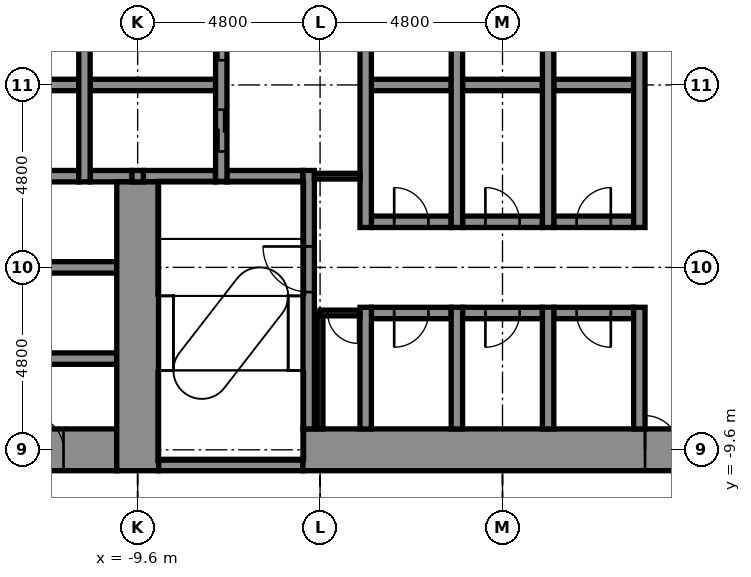
"""IFC4 building model, lengths in metres.
Left out: names, types, materials, properties, quantities, classifications, styles, units other than length and angle.
Written with IfcOpenShell. Run it as: python <this file> out.ifc"""

import sys

from ifc_helpers import new_model, si_unit, direction, frame, frame_2d, origin, place, context, subcontext, project, spatial, rectangle, extrude, element, fill, save


model = new_model("IFC4")
c1 = context("Model", 3, precision=1e-05, world=origin(), true_north=direction((0.0, 1.0)))
c2 = subcontext(c1, "Body", "Model", "MODEL_VIEW")
j1 = project(units=[si_unit("LENGTHUNIT", "METRE"), si_unit("PLANEANGLEUNIT", "RADIAN")], contexts=[c1])
p1 = place(None, origin())
s1 = spatial("IfcSite", under=j1, at=p1, CompositionType="ELEMENT")
p2 = place(p1, origin())
s2 = spatial("IfcBuilding", under=s1, at=p2, CompositionType="ELEMENT")
p3 = place(p2, frame((0.0, 0.0, 12.4)))
s3 = spatial("IfcBuildingStorey", under=s2, at=p3, CompositionType="ELEMENT", Elevation=12.4)
p4 = place(p3, frame((-9.05, -10.0, -0.3), z_axis=(0.0, 0.0, 1.0), x_axis=(1.0, 0.0, 0.0)))
e1 = element("IfcWall", 1, at=p4, inside=s3, PredefinedType="STANDARD", context=c2, shape_type="SweptSolid", body=[
    extrude(rectangle(XDim=3.8, YDim=0.3, at=frame_2d((1.9, 0.0))), origin(), (0.0, 0.0, 1.0), 5.05),
])
p5 = place(p3, frame((-13.85, -9.6, -0.3), z_axis=(0.0, 0.0, 1.0), x_axis=(1.0, 0.0, 0.0)))
e2 = element("IfcWall", 2, at=p5, inside=s3, PredefinedType="SHEAR", context=c2, shape_type="SweptSolid", body=[
    extrude(rectangle(XDim=3.7, YDim=1.1, at=frame_2d((1.85, 0.0))), origin(), (0.0, 0.0, 1.0), 5.05),
])
p6 = place(p5, frame((1.4, 0.0, 0.3)))
e3 = element("IfcOpeningElement", 3, at=p6, cuts=e2, PredefinedType="OPENING", context=c2, shape_type="SweptSolid", body=[
    extrude(rectangle(XDim=0.9, YDim=2.1, at=frame_2d((0.45, 1.05))), frame((0.0, 0.56, 0.0), z_axis=(0.0, -1.0, 0.0), x_axis=(1.0, 0.0, 0.0)), (0.0, 0.0, 1.0), 1.12),
])
p7 = place(p3, frame((-5.25, -9.6, -0.3), z_axis=(0.0, 0.0, 1.0), x_axis=(1.0, 0.0, 0.0)))
e4 = element("IfcWall", 4, at=p7, inside=s3, PredefinedType="SHEAR", context=c2, shape_type="SweptSolid", body=[
    extrude(rectangle(XDim=10.2, YDim=1.1, at=frame_2d((5.1, 0.0))), origin(), (0.0, 0.0, 1.0), 5.05),
])
p8 = place(p7, frame((9.0, 0.0, 0.3)))
e5 = element("IfcOpeningElement", 5, at=p8, cuts=e4, PredefinedType="OPENING", context=c2, shape_type="SweptSolid", body=[
    extrude(rectangle(XDim=0.9, YDim=2.1, at=frame_2d((0.45, 1.05))), frame((0.0, 0.56, 0.0), z_axis=(0.0, -1.0, 0.0), x_axis=(1.0, 0.0, 0.0)), (0.0, 0.0, 1.0), 1.12),
])
p9 = place(p3, frame((-13.85, -7.2, -0.3), z_axis=(0.0, 0.0, 1.0), x_axis=(1.0, 0.0, 0.0)))
e6 = element("IfcWall", 6, at=p9, inside=s3, PredefinedType="STANDARD", context=c2, shape_type="SweptSolid", body=[
    extrude(rectangle(XDim=3.7, YDim=0.3, at=frame_2d((1.85, 0.0))), origin(), (0.0, 0.0, 1.0), 5.05),
])
p10 = place(p3, frame((-3.45, -6.0, -0.3), z_axis=(0.0, 0.0, 1.0), x_axis=(1.0, 0.0, 0.0)))
e7 = element("IfcWall", 7, at=p10, inside=s3, PredefinedType="STANDARD", context=c2, shape_type="SweptSolid", body=[
    extrude(rectangle(XDim=2.1, YDim=0.3, at=frame_2d((1.05, 0.0))), origin(), (0.0, 0.0, 1.0), 5.05),
])
p11 = place(p10, frame((0.6, 0.0, 0.3)))
e8 = element("IfcOpeningElement", 8, at=p11, cuts=e7, PredefinedType="OPENING", context=c2, shape_type="SweptSolid", body=[
    extrude(rectangle(XDim=0.9, YDim=2.1, at=frame_2d((0.45, 1.05))), frame((0.0, 0.16, 0.0), z_axis=(0.0, -1.0, 0.0), x_axis=(1.0, 0.0, 0.0)), (0.0, 0.0, 1.0), 0.32),
])
p12 = place(p3, frame((-1.05, -6.0, -0.3), z_axis=(0.0, 0.0, 1.0), x_axis=(1.0, 0.0, 0.0)))
e9 = element("IfcWall", 9, at=p12, inside=s3, PredefinedType="STANDARD", context=c2, shape_type="SweptSolid", body=[
    extrude(rectangle(XDim=2.1, YDim=0.3, at=frame_2d((1.05, 0.0))), origin(), (0.0, 0.0, 1.0), 5.05),
])
p13 = place(p12, frame((0.6, 0.0, 0.3)))
e10 = element("IfcOpeningElement", 10, at=p13, cuts=e9, PredefinedType="OPENING", context=c2, shape_type="SweptSolid", body=[
    extrude(rectangle(XDim=0.9, YDim=2.1, at=frame_2d((0.45, 1.05))), frame((0.0, 0.16, 0.0), z_axis=(0.0, -1.0, 0.0), x_axis=(1.0, 0.0, 0.0)), (0.0, 0.0, 1.0), 0.32),
])
p14 = place(p3, frame((1.35, -6.0, -0.3), z_axis=(0.0, 0.0, 1.0), x_axis=(1.0, 0.0, 0.0)))
e11 = element("IfcWall", 11, at=p14, inside=s3, PredefinedType="STANDARD", context=c2, shape_type="SweptSolid", body=[
    extrude(rectangle(XDim=2.1, YDim=0.3, at=frame_2d((1.05, 0.0))), origin(), (0.0, 0.0, 1.0), 5.05),
])
p15 = place(p14, frame((0.6, 0.0, 0.3)))
e12 = element("IfcOpeningElement", 12, at=p15, cuts=e11, PredefinedType="OPENING", context=c2, shape_type="SweptSolid", body=[
    extrude(rectangle(XDim=0.9, YDim=2.1, at=frame_2d((0.45, 1.05))), frame((0.0, 0.16, 0.0), z_axis=(0.0, -1.0, 0.0), x_axis=(1.0, 0.0, 0.0)), (0.0, 0.0, 1.0), 0.32),
])
p16 = place(p3, frame((-13.85, -4.8, -0.3), z_axis=(0.0, 0.0, 1.0), x_axis=(1.0, 0.0, 0.0)))
e13 = element("IfcWall", 13, at=p16, inside=s3, PredefinedType="STANDARD", context=c2, shape_type="SweptSolid", body=[
    extrude(rectangle(XDim=3.7, YDim=0.3, at=frame_2d((1.85, 0.0))), origin(), (0.0, 0.0, 1.0), 5.05),
])
p17 = place(p3, frame((-3.45, -3.6, -0.3), z_axis=(0.0, 0.0, 1.0), x_axis=(1.0, 0.0, 0.0)))
e14 = element("IfcWall", 14, at=p17, inside=s3, PredefinedType="STANDARD", context=c2, shape_type="SweptSolid", body=[
    extrude(rectangle(XDim=2.1, YDim=0.3, at=frame_2d((1.05, 0.0))), origin(), (0.0, 0.0, 1.0), 5.05),
])
p18 = place(p17, frame((0.6, 0.0, 0.3)))
e15 = element("IfcOpeningElement", 15, at=p18, cuts=e14, PredefinedType="OPENING", context=c2, shape_type="SweptSolid", body=[
    extrude(rectangle(XDim=0.9, YDim=2.1, at=frame_2d((0.45, 1.05))), frame((0.0, 0.16, 0.0), z_axis=(0.0, -1.0, 0.0), x_axis=(1.0, 0.0, 0.0)), (0.0, 0.0, 1.0), 0.32),
])
p19 = place(p3, frame((-1.05, -3.6, -0.3), z_axis=(0.0, 0.0, 1.0), x_axis=(1.0, 0.0, 0.0)))
e16 = element("IfcWall", 16, at=p19, inside=s3, PredefinedType="STANDARD", context=c2, shape_type="SweptSolid", body=[
    extrude(rectangle(XDim=2.1, YDim=0.3, at=frame_2d((1.05, 0.0))), origin(), (0.0, 0.0, 1.0), 5.05),
])
p20 = place(p19, frame((0.6, 0.0, 0.3)))
e17 = element("IfcOpeningElement", 17, at=p20, cuts=e16, PredefinedType="OPENING", context=c2, shape_type="SweptSolid", body=[
    extrude(rectangle(XDim=0.9, YDim=2.1, at=frame_2d((0.45, 1.05))), frame((0.0, 0.16, 0.0), z_axis=(0.0, -1.0, 0.0), x_axis=(1.0, 0.0, 0.0)), (0.0, 0.0, 1.0), 0.32),
])
p21 = place(p3, frame((1.35, -3.6, -0.3), z_axis=(0.0, 0.0, 1.0), x_axis=(1.0, 0.0, 0.0)))
e18 = element("IfcWall", 18, at=p21, inside=s3, PredefinedType="STANDARD", context=c2, shape_type="SweptSolid", body=[
    extrude(rectangle(XDim=2.1, YDim=0.3, at=frame_2d((1.05, 0.0))), origin(), (0.0, 0.0, 1.0), 5.05),
])
p22 = place(p21, frame((0.6, 0.0, 0.3)))
e19 = element("IfcOpeningElement", 19, at=p22, cuts=e18, PredefinedType="OPENING", context=c2, shape_type="SweptSolid", body=[
    extrude(rectangle(XDim=0.9, YDim=2.1, at=frame_2d((0.45, 1.05))), frame((0.0, 0.16, 0.0), z_axis=(0.0, -1.0, 0.0), x_axis=(1.0, 0.0, 0.0)), (0.0, 0.0, 1.0), 0.32),
])
p23 = place(p3, frame((-13.85, -2.4, -0.3), z_axis=(0.0, 0.0, 1.0), x_axis=(1.0, 0.0, 0.0)))
e20 = element("IfcWall", 20, at=p23, inside=s3, PredefinedType="STANDARD", context=c2, shape_type="SweptSolid", body=[
    extrude(rectangle(XDim=2.7, YDim=0.3, at=frame_2d((1.35, 0.0))), origin(), (0.0, 0.0, 1.0), 5.05),
])
p24 = place(p3, frame((-10.85, -2.4, -0.3), z_axis=(0.0, 0.0, 1.0), x_axis=(1.0, 0.0, 0.0)))
e21 = element("IfcWall", 21, at=p24, inside=s3, PredefinedType="STANDARD", context=c2, shape_type="SweptSolid", body=[
    extrude(rectangle(XDim=1.1, YDim=0.3, at=frame_2d((0.55, 0.0))), origin(), (0.0, 0.0, 1.0), 5.05),
])
p25 = place(p3, frame((-9.45, -2.4, -0.3), z_axis=(0.0, 0.0, 1.0), x_axis=(1.0, 0.0, 0.0)))
e22 = element("IfcWall", 22, at=p25, inside=s3, PredefinedType="STANDARD", context=c2, shape_type="SweptSolid", body=[
    extrude(rectangle(XDim=1.9, YDim=0.3, at=frame_2d((0.95, 0.0))), origin(), (0.0, 0.0, 1.0), 5.05),
])
p26 = place(p3, frame((-7.25, -2.4, -0.3), z_axis=(0.0, 0.0, 1.0), x_axis=(1.0, 0.0, 0.0)))
e23 = element("IfcWall", 23, at=p26, inside=s3, PredefinedType="STANDARD", context=c2, shape_type="SweptSolid", body=[
    extrude(rectangle(XDim=2.0, YDim=0.3, at=frame_2d((1.0, 0.0))), origin(), (0.0, 0.0, 1.0), 5.05),
])
p27 = place(p3, frame((-13.85, 0.0, -0.3), z_axis=(0.0, 0.0, 1.0), x_axis=(1.0, 0.0, 0.0)))
e24 = element("IfcWall", 24, at=p27, inside=s3, PredefinedType="STANDARD", context=c2, shape_type="SweptSolid", body=[
    extrude(rectangle(XDim=2.7, YDim=0.3, at=frame_2d((1.35, 0.0))), origin(), (0.0, 0.0, 1.0), 5.05),
])
p28 = place(p3, frame((-10.85, 0.0, -0.3), z_axis=(0.0, 0.0, 1.0), x_axis=(1.0, 0.0, 0.0)))
e25 = element("IfcWall", 25, at=p28, inside=s3, PredefinedType="STANDARD", context=c2, shape_type="SweptSolid", body=[
    extrude(rectangle(XDim=3.3, YDim=0.3, at=frame_2d((1.65, 0.0))), origin(), (0.0, 0.0, 1.0), 5.05),
])
p29 = place(p3, frame((-3.45, 0.0, -0.3), z_axis=(0.0, 0.0, 1.0), x_axis=(1.0, 0.0, 0.0)))
e26 = element("IfcWall", 26, at=p29, inside=s3, PredefinedType="STANDARD", context=c2, shape_type="SweptSolid", body=[
    extrude(rectangle(XDim=2.1, YDim=0.3, at=frame_2d((1.05, 0.0))), origin(), (0.0, 0.0, 1.0), 5.05),
])
p30 = place(p3, frame((-1.05, 0.0, -0.3), z_axis=(0.0, 0.0, 1.0), x_axis=(1.0, 0.0, 0.0)))
e27 = element("IfcWall", 27, at=p30, inside=s3, PredefinedType="STANDARD", context=c2, shape_type="SweptSolid", body=[
    extrude(rectangle(XDim=2.1, YDim=0.3, at=frame_2d((1.05, 0.0))), origin(), (0.0, 0.0, 1.0), 5.05),
])
p31 = place(p3, frame((1.35, 0.0, -0.3), z_axis=(0.0, 0.0, 1.0), x_axis=(1.0, 0.0, 0.0)))
e28 = element("IfcWall", 28, at=p31, inside=s3, PredefinedType="STANDARD", context=c2, shape_type="SweptSolid", body=[
    extrude(rectangle(XDim=2.1, YDim=0.3, at=frame_2d((1.05, 0.0))), origin(), (0.0, 0.0, 1.0), 5.05),
])
p32 = place(p3, frame((-11.0, -2.55, -0.3), z_axis=(0.0, 0.0, 1.0), x_axis=(0.0, 1.0, 0.0)))
e29 = element("IfcWall", 29, at=p32, inside=s3, PredefinedType="STANDARD", context=c2, shape_type="SweptSolid", body=[
    extrude(rectangle(XDim=5.1, YDim=0.3, at=frame_2d((2.55, 0.0))), origin(), (0.0, 0.0, 1.0), 5.05),
])
p33 = place(p3, frame((-9.6, -10.15, -0.3), z_axis=(0.0, 0.0, 1.0), x_axis=(0.0, 1.0, 0.0)))
e30 = element("IfcWall", 30, at=p33, inside=s3, PredefinedType="SHEAR", context=c2, shape_type="SweptSolid", body=[
    extrude(rectangle(XDim=7.6, YDim=1.1, at=frame_2d((3.8, 0.0))), origin(), (0.0, 0.0, 1.0), 5.05),
])
p34 = place(p3, frame((-9.6, -2.55, -0.3), z_axis=(0.0, 0.0, 1.0), x_axis=(0.0, 1.0, 0.0)))
e31 = element("IfcWall", 31, at=p34, inside=s3, PredefinedType="STANDARD", context=c2, shape_type="SweptSolid", body=[
    extrude(rectangle(XDim=0.3, YDim=0.3, at=frame_2d((0.15, 0.0))), origin(), (0.0, 0.0, 1.0), 5.05),
])
p35 = place(p3, frame((-7.4, -2.55, -0.3), z_axis=(0.0, 0.0, 1.0), x_axis=(0.0, 1.0, 0.0)))
e32 = element("IfcWall", 32, at=p35, inside=s3, PredefinedType="STANDARD", context=c2, shape_type="SweptSolid", body=[
    extrude(rectangle(XDim=5.1, YDim=0.3, at=frame_2d((2.55, 0.0))), origin(), (0.0, 0.0, 1.0), 5.05),
])
p36 = place(p35, frame((0.8, 0.0, 0.3)))
e33 = element("IfcOpeningElement", 33, at=p36, cuts=e32, PredefinedType="OPENING", context=c2, shape_type="SweptSolid", body=[
    extrude(rectangle(XDim=1.1, YDim=2.1, at=frame_2d((0.55, 1.05))), frame((0.0, 0.16, 0.0), z_axis=(0.0, -1.0, 0.0), x_axis=(1.0, 0.0, 0.0)), (0.0, 0.0, 1.0), 0.32),
])
p37 = place(p35, frame((3.2, 0.0, 0.3)))
e34 = element("IfcOpeningElement", 34, at=p37, cuts=e32, PredefinedType="OPENING", context=c2, shape_type="SweptSolid", body=[
    extrude(rectangle(XDim=1.1, YDim=2.1, at=frame_2d((0.55, 1.05))), frame((0.0, 0.16, 0.0), z_axis=(0.0, -1.0, 0.0), x_axis=(1.0, 0.0, 0.0)), (0.0, 0.0, 1.0), 0.32),
])
p38 = place(p3, frame((-5.1, -9.05, -0.3), z_axis=(0.0, 0.0, 1.0), x_axis=(0.0, 1.0, 0.0)))
e35 = element("IfcWall", 35, at=p38, inside=s3, PredefinedType="STANDARD", context=c2, shape_type="SweptSolid", body=[
    extrude(rectangle(XDim=6.8, YDim=0.3, at=frame_2d((3.4, 0.0))), origin(), (0.0, 0.0, 1.0), 5.05),
])
p39 = place(p38, frame((3.6, 0.0, 0.3)))
e36 = element("IfcOpeningElement", 36, at=p39, cuts=e35, PredefinedType="OPENING", context=c2, shape_type="SweptSolid", body=[
    extrude(rectangle(XDim=1.2, YDim=2.1, at=frame_2d((0.6, 1.05))), frame((0.0, 0.16, 0.0), z_axis=(0.0, -1.0, 0.0), x_axis=(1.0, 0.0, 0.0)), (0.0, 0.0, 1.0), 0.32),
])
p40 = place(p3, frame((-3.6, -9.05, -0.3), z_axis=(0.0, 0.0, 1.0), x_axis=(0.0, 1.0, 0.0)))
e37 = element("IfcWall", 37, at=p40, inside=s3, PredefinedType="STANDARD", context=c2, shape_type="SweptSolid", body=[
    extrude(rectangle(XDim=3.2, YDim=0.3, at=frame_2d((1.6, 0.0))), origin(), (0.0, 0.0, 1.0), 5.05),
])
p41 = place(p3, frame((-3.6, -3.75, -0.3), z_axis=(0.0, 0.0, 1.0), x_axis=(0.0, 1.0, 0.0)))
e38 = element("IfcWall", 38, at=p41, inside=s3, PredefinedType="STANDARD", context=c2, shape_type="SweptSolid", body=[
    extrude(rectangle(XDim=7.5, YDim=0.3, at=frame_2d((3.75, 0.0))), origin(), (0.0, 0.0, 1.0), 5.05),
])
p42 = place(p3, frame((-1.2, -9.05, -0.3), z_axis=(0.0, 0.0, 1.0), x_axis=(0.0, 1.0, 0.0)))
e39 = element("IfcWall", 39, at=p42, inside=s3, PredefinedType="STANDARD", context=c2, shape_type="SweptSolid", body=[
    extrude(rectangle(XDim=3.2, YDim=0.3, at=frame_2d((1.6, 0.0))), origin(), (0.0, 0.0, 1.0), 5.05),
])
p43 = place(p3, frame((-1.2, -3.75, -0.3), z_axis=(0.0, 0.0, 1.0), x_axis=(0.0, 1.0, 0.0)))
e40 = element("IfcWall", 40, at=p43, inside=s3, PredefinedType="STANDARD", context=c2, shape_type="SweptSolid", body=[
    extrude(rectangle(XDim=7.5, YDim=0.3, at=frame_2d((3.75, 0.0))), origin(), (0.0, 0.0, 1.0), 5.05),
])
p44 = place(p3, frame((1.2, -9.05, -0.3), z_axis=(0.0, 0.0, 1.0), x_axis=(0.0, 1.0, 0.0)))
e41 = element("IfcWall", 41, at=p44, inside=s3, PredefinedType="STANDARD", context=c2, shape_type="SweptSolid", body=[
    extrude(rectangle(XDim=3.2, YDim=0.3, at=frame_2d((1.6, 0.0))), origin(), (0.0, 0.0, 1.0), 5.05),
])
p45 = place(p3, frame((1.2, -3.75, -0.3), z_axis=(0.0, 0.0, 1.0), x_axis=(0.0, 1.0, 0.0)))
e42 = element("IfcWall", 42, at=p45, inside=s3, PredefinedType="STANDARD", context=c2, shape_type="SweptSolid", body=[
    extrude(rectangle(XDim=7.5, YDim=0.3, at=frame_2d((3.75, 0.0))), origin(), (0.0, 0.0, 1.0), 5.05),
])
p46 = place(p3, frame((3.6, -9.05, -0.3), z_axis=(0.0, 0.0, 1.0), x_axis=(0.0, 1.0, 0.0)))
e43 = element("IfcWall", 43, at=p46, inside=s3, PredefinedType="STANDARD", context=c2, shape_type="SweptSolid", body=[
    extrude(rectangle(XDim=3.2, YDim=0.3, at=frame_2d((1.6, 0.0))), origin(), (0.0, 0.0, 1.0), 5.05),
])
p47 = place(p3, frame((3.6, -3.75, -0.3), z_axis=(0.0, 0.0, 1.0), x_axis=(0.0, 1.0, 0.0)))
e44 = element("IfcWall", 44, at=p47, inside=s3, PredefinedType="STANDARD", context=c2, shape_type="SweptSolid", body=[
    extrude(rectangle(XDim=7.5, YDim=0.3, at=frame_2d((3.75, 0.0))), origin(), (0.0, 0.0, 1.0), 5.05),
])
p48 = place(p3, frame((-4.8, -9.05, 0.0), z_axis=(0.0, 0.0, 1.0), x_axis=(0.0, 1.0, 0.0)))
e45 = element("IfcWall", 45, at=p48, inside=s3, PredefinedType="PARTITIONING", context=c2, shape_type="SweptSolid", body=[
    extrude(rectangle(XDim=3.05, YDim=0.15, at=frame_2d((1.525, 0.0))), origin(), (0.0, 0.0, 1.0), 4.7),
])
p49 = place(p3, frame((-4.8, -6.0, 0.0), z_axis=(0.0, 0.0, 1.0), x_axis=(1.0, 0.0, 0.0)))
e46 = element("IfcWall", 46, at=p49, inside=s3, PredefinedType="PARTITIONING", context=c2, shape_type="SweptSolid", body=[
    extrude(rectangle(XDim=1.05, YDim=0.15, at=frame_2d((0.525, 0.0))), origin(), (0.0, 0.0, 1.0), 4.7),
])
p50 = place(p49, frame((0.2, 0.0, 0.0)))
e47 = element("IfcOpeningElement", 47, at=p50, cuts=e46, PredefinedType="OPENING", context=c2, shape_type="SweptSolid", body=[
    extrude(rectangle(XDim=0.8, YDim=2.1, at=frame_2d((0.4, 1.05))), frame((0.0, 0.085, 0.0), z_axis=(0.0, -1.0, 0.0), x_axis=(1.0, 0.0, 0.0)), (0.0, 0.0, 1.0), 0.17),
])
p51 = place(p3, frame((-4.95, -2.4, 0.0), z_axis=(0.0, 0.0, 1.0), x_axis=(1.0, 0.0, 0.0)))
e48 = element("IfcWall", 48, at=p51, inside=s3, PredefinedType="PARTITIONING", context=c2, shape_type="SweptSolid", body=[
    extrude(rectangle(XDim=1.2, YDim=0.15, at=frame_2d((0.6, 0.0))), origin(), (0.0, 0.0, 1.0), 4.75),
])
p52 = place(p50, frame((0.8, 0.0, 0.0), z_axis=(0.0, 0.0, 1.0), x_axis=(-1.0, 0.0, 0.0)))
e49 = element("IfcDoor", 49, at=p52, inside=s3, OperationType="SINGLE_SWING_RIGHT", PredefinedType="DOOR", context=c2, shape_type="SweptSolid", body=[
    extrude(rectangle(XDim=0.8, YDim=2.1, at=frame_2d((0.4, 1.05))), frame((0.0, 0.025, 0.0), z_axis=(0.0, -1.0, 0.0), x_axis=(1.0, 0.0, 0.0)), (0.0, 0.0, 1.0), 0.05),
])
fill(e47, e49)
p53 = place(p36, origin())
e50 = element("IfcDoor", 50, at=p53, inside=s3, OperationType="DOUBLE_DOOR_SLIDING", PredefinedType="DOOR", context=c2, shape_type="SweptSolid", body=[
    extrude(rectangle(XDim=1.1, YDim=2.1, at=frame_2d((0.55, 1.05))), frame((0.0, 0.025, 0.0), z_axis=(0.0, -1.0, 0.0), x_axis=(1.0, 0.0, 0.0)), (0.0, 0.0, 1.0), 0.05),
])
fill(e33, e50)
p54 = place(p37, origin())
e51 = element("IfcDoor", 51, at=p54, inside=s3, OperationType="DOUBLE_DOOR_SLIDING", PredefinedType="DOOR", context=c2, shape_type="SweptSolid", body=[
    extrude(rectangle(XDim=1.1, YDim=2.1, at=frame_2d((0.55, 1.05))), frame((0.0, 0.025, 0.0), z_axis=(0.0, -1.0, 0.0), x_axis=(1.0, 0.0, 0.0)), (0.0, 0.0, 1.0), 0.05),
])
fill(e34, e51)
p55 = place(p39, origin())
e52 = element("IfcDoor", 52, at=p55, inside=s3, OperationType="SINGLE_SWING_RIGHT", PredefinedType="DOOR", context=c2, shape_type="SweptSolid", body=[
    extrude(rectangle(XDim=1.2, YDim=2.1, at=frame_2d((0.6, 1.05))), frame((0.0, 0.025, 0.0), z_axis=(0.0, -1.0, 0.0), x_axis=(1.0, 0.0, 0.0)), (0.0, 0.0, 1.0), 0.05),
])
fill(e36, e52)
p56 = place(p18, origin())
e53 = element("IfcDoor", 53, at=p56, inside=s3, OperationType="SINGLE_SWING_LEFT", PredefinedType="DOOR", context=c2, shape_type="SweptSolid", body=[
    extrude(rectangle(XDim=0.9, YDim=2.1, at=frame_2d((0.45, 1.05))), frame((0.0, 0.025, 0.0), z_axis=(0.0, -1.0, 0.0), x_axis=(1.0, 0.0, 0.0)), (0.0, 0.0, 1.0), 0.05),
])
fill(e15, e53)
p57 = place(p20, origin())
e54 = element("IfcDoor", 54, at=p57, inside=s3, OperationType="SINGLE_SWING_LEFT", PredefinedType="DOOR", context=c2, shape_type="SweptSolid", body=[
    extrude(rectangle(XDim=0.9, YDim=2.1, at=frame_2d((0.45, 1.05))), frame((0.0, 0.025, 0.0), z_axis=(0.0, -1.0, 0.0), x_axis=(1.0, 0.0, 0.0)), (0.0, 0.0, 1.0), 0.05),
])
fill(e17, e54)
p58 = place(p22, origin())
e55 = element("IfcDoor", 55, at=p58, inside=s3, OperationType="SINGLE_SWING_RIGHT", PredefinedType="DOOR", context=c2, shape_type="SweptSolid", body=[
    extrude(rectangle(XDim=0.9, YDim=2.1, at=frame_2d((0.45, 1.05))), frame((0.0, 0.025, 0.0), z_axis=(0.0, -1.0, 0.0), x_axis=(1.0, 0.0, 0.0)), (0.0, 0.0, 1.0), 0.05),
])
fill(e19, e55)
p59 = place(p11, frame((0.9, 0.0, 0.0), z_axis=(0.0, 0.0, 1.0), x_axis=(-1.0, 0.0, 0.0)))
e56 = element("IfcDoor", 56, at=p59, inside=s3, OperationType="SINGLE_SWING_LEFT", PredefinedType="DOOR", context=c2, shape_type="SweptSolid", body=[
    extrude(rectangle(XDim=0.9, YDim=2.1, at=frame_2d((0.45, 1.05))), frame((0.0, 0.025, 0.0), z_axis=(0.0, -1.0, 0.0), x_axis=(1.0, 0.0, 0.0)), (0.0, 0.0, 1.0), 0.05),
])
fill(e8, e56)
p60 = place(p13, frame((0.9, 0.0, 0.0), z_axis=(0.0, 0.0, 1.0), x_axis=(-1.0, 0.0, 0.0)))
e57 = element("IfcDoor", 57, at=p60, inside=s3, OperationType="SINGLE_SWING_LEFT", PredefinedType="DOOR", context=c2, shape_type="SweptSolid", body=[
    extrude(rectangle(XDim=0.9, YDim=2.1, at=frame_2d((0.45, 1.05))), frame((0.0, 0.025, 0.0), z_axis=(0.0, -1.0, 0.0), x_axis=(1.0, 0.0, 0.0)), (0.0, 0.0, 1.0), 0.05),
])
fill(e10, e57)
p61 = place(p15, frame((0.9, 0.0, 0.0), z_axis=(0.0, 0.0, 1.0), x_axis=(-1.0, 0.0, 0.0)))
e58 = element("IfcDoor", 58, at=p61, inside=s3, OperationType="SINGLE_SWING_RIGHT", PredefinedType="DOOR", context=c2, shape_type="SweptSolid", body=[
    extrude(rectangle(XDim=0.9, YDim=2.1, at=frame_2d((0.45, 1.05))), frame((0.0, 0.025, 0.0), z_axis=(0.0, -1.0, 0.0), x_axis=(1.0, 0.0, 0.0)), (0.0, 0.0, 1.0), 0.05),
])
fill(e12, e58)
p62 = place(p6, origin())
e59 = element("IfcDoor", 59, at=p62, inside=s3, OperationType="SINGLE_SWING_LEFT", PredefinedType="DOOR", context=c2, shape_type="SweptSolid", body=[
    extrude(rectangle(XDim=0.9, YDim=2.1, at=frame_2d((0.45, 1.05))), frame((0.0, 0.025, 0.0), z_axis=(0.0, -1.0, 0.0), x_axis=(1.0, 0.0, 0.0)), (0.0, 0.0, 1.0), 0.05),
])
fill(e3, e59)
p63 = place(p8, origin())
e60 = element("IfcDoor", 60, at=p63, inside=s3, OperationType="SINGLE_SWING_LEFT", PredefinedType="DOOR", context=c2, shape_type="SweptSolid", body=[
    extrude(rectangle(XDim=0.9, YDim=2.1, at=frame_2d((0.45, 1.05))), frame((0.0, 0.025, 0.0), z_axis=(0.0, -1.0, 0.0), x_axis=(1.0, 0.0, 0.0)), (0.0, 0.0, 1.0), 0.05),
])
fill(e5, e60)
save(model, sys.argv[1])
